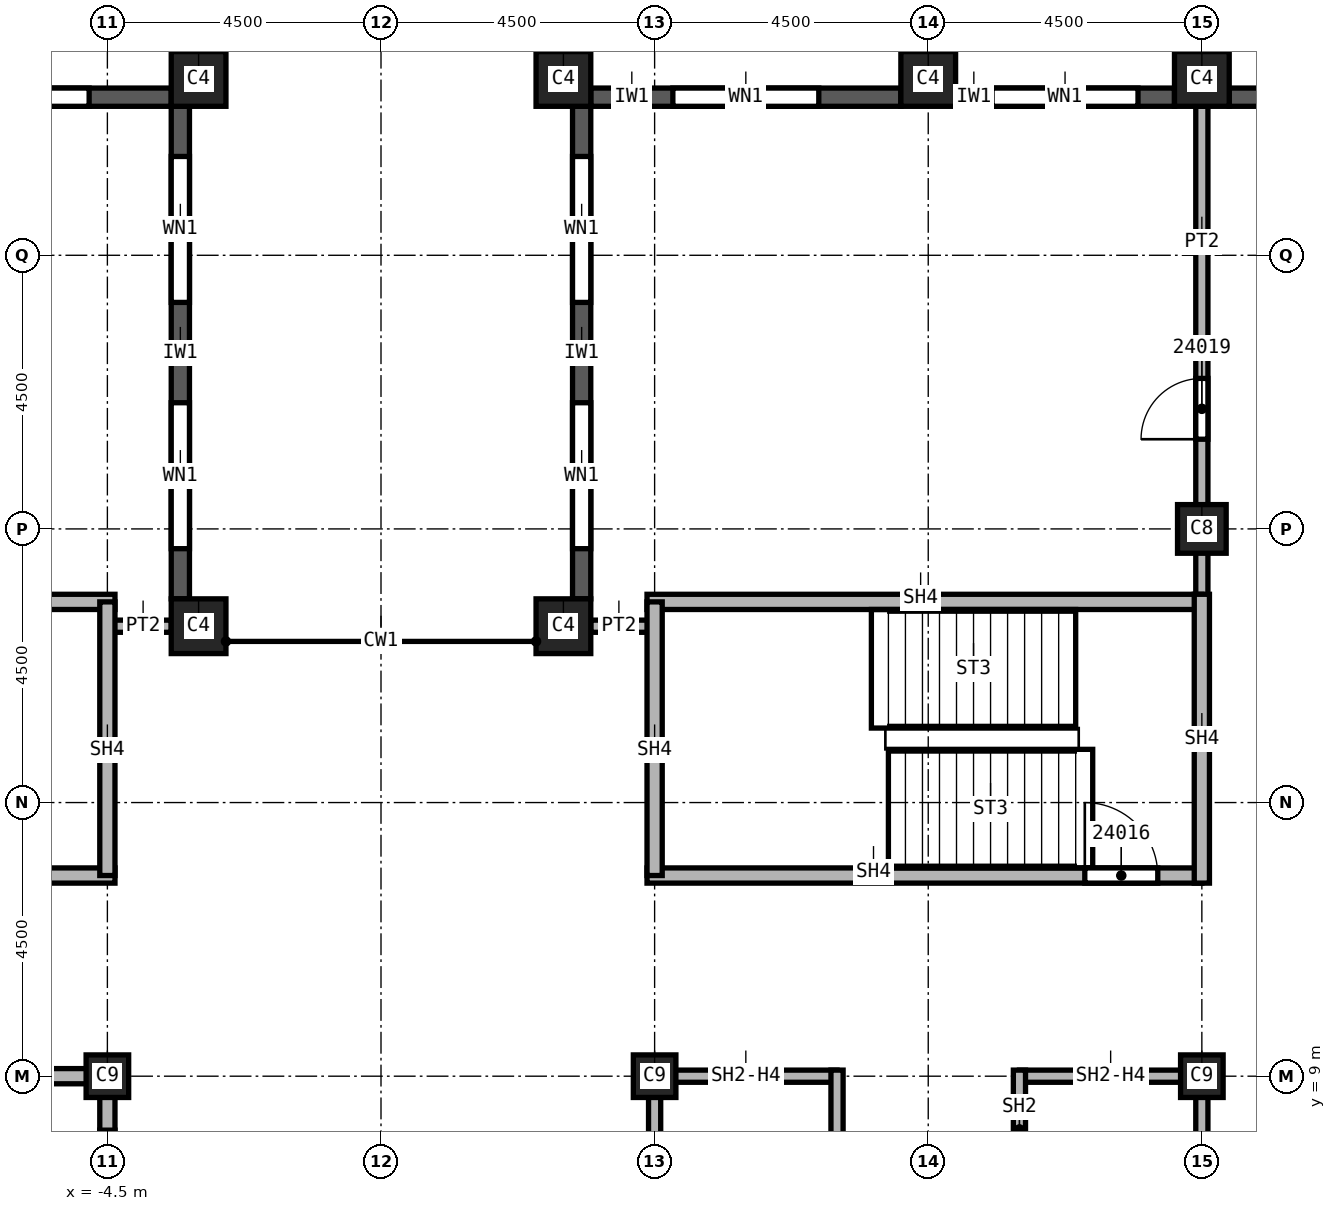
"""IFC4 building model, lengths in metres.
Left out: names, types, materials, properties, quantities, classifications, styles, units other than length and angle.
Written with IfcOpenShell. Run it as: python <this file> out.ifc"""

import sys

from ifc_helpers import new_model, si_unit, direction, frame, frame_2d, origin, origin_2d, place, context, subcontext, project, spatial, rectangle, extrude, element, fill, save


model = new_model("IFC4")
c1 = context("Model", 3, precision=1e-05, world=origin(), true_north=direction((0.0, 1.0)))
c2 = subcontext(c1, "Body", "Model", "MODEL_VIEW")
j1 = project(units=[si_unit("LENGTHUNIT", "METRE"), si_unit("PLANEANGLEUNIT", "RADIAN")], contexts=[c1])
p1 = place(None, origin())
s1 = spatial("IfcSite", under=j1, at=p1, CompositionType="ELEMENT")
p2 = place(p1, origin())
s2 = spatial("IfcBuilding", under=s1, at=p2, CompositionType="ELEMENT")
p3 = place(p2, frame((0.0, 0.0, 338.0)))
s3 = spatial("IfcBuildingStorey", under=s2, at=p3, CompositionType="ELEMENT", Elevation=338.0)
p4 = place(p3, frame((13.5, 18.0, 0.0), z_axis=(0.0, 0.0, 1.0), x_axis=(1.0, 0.0, 0.0)))
e1 = element("IfcColumn", 1, at=p4, inside=s3, PredefinedType="COLUMN", context=c2, shape_type="SweptSolid", body=[
    extrude(rectangle(XDim=0.8, YDim=0.8, at=origin_2d()), origin(), (0.0, 0.0, 1.0), 3.74),
])
for number, where, z_axis, x_axis in (
    (2, (4.5, 9.0, 0.0), (0.0, 0.0, 1.0), (1.0, 0.0, 0.0)),
    (3, (13.5, 9.0, 0.0), (0.0, 0.0, 1.0), (1.0, 0.0, 0.0)),
    (4, (-4.5, 9.0, 0.0), (0.0, 0.0, 1.0), (1.0, 0.0, 0.0)),
):
    element("IfcColumn", number, at=place(p3, frame(where, z_axis=z_axis, x_axis=x_axis)), inside=s3, PredefinedType="COLUMN", context=c2, shape_type="SweptSolid", body=[
        extrude(rectangle(XDim=0.7, YDim=0.7, at=origin_2d()), origin(), (0.0, 0.0, 1.0), 3.74),
    ])
for number, where, z_axis, x_axis in (
    (5, (3.0, 25.4, 0.0), (0.0, 0.0, 1.0), (1.0, 0.0, 0.0)),
    (6, (9.0, 25.4, 0.0), (0.0, 0.0, 1.0), (1.0, 0.0, 0.0)),
    (7, (13.5, 25.4, 0.0), (0.0, 0.0, 1.0), (1.0, 0.0, 0.0)),
    (8, (-3.0, 25.4, 0.0), (0.0, 0.0, 1.0), (1.0, 0.0, 0.0)),
    (9, (3.0, 16.4, 0.0), (0.0, 0.0, 1.0), (1.0, 0.0, 0.0)),
    (10, (-3.0, 16.4, 0.0), (0.0, 0.0, 1.0), (1.0, 0.0, 0.0)),
):
    element("IfcColumn", number, at=place(p3, frame(where, z_axis=z_axis, x_axis=x_axis)), inside=s3, PredefinedType="COLUMN", context=c2, shape_type="SweptSolid", body=[
        extrude(rectangle(XDim=0.9, YDim=0.9, at=origin_2d()), origin(), (0.0, 0.0, 1.0), 3.74),
    ])
p5 = place(p3, frame((17.55, 25.1, 0.0), z_axis=(0.0, 0.0, 1.0), x_axis=(-1.0, 0.0, 0.0)))
e11 = element("IfcWall", 11, at=p5, inside=s3, PredefinedType="SOLIDWALL", context=c2, shape_type="SweptSolid", body=[
    extrude(rectangle(XDim=3.6, YDim=0.3, at=frame_2d((1.8, 0.0))), origin(), (0.0, 0.0, 1.0), 3.14),
])
p6 = place(p5, frame((0.775, 0.0, 0.8)))
e12 = element("IfcOpeningElement", 12, at=p6, cuts=e11, PredefinedType="OPENING", context=c2, shape_type="SweptSolid", body=[
    extrude(rectangle(XDim=1.0, YDim=1.95, at=frame_2d((0.5, 0.975))), frame((0.0, 0.15, 0.0), z_axis=(0.0, -1.0, 0.0), x_axis=(1.0, 0.0, 0.0)), (0.0, 0.0, 1.0), 0.3),
])
p7 = place(p5, frame((2.375, 0.0, 0.8)))
e13 = element("IfcOpeningElement", 13, at=p7, cuts=e11, PredefinedType="OPENING", context=c2, shape_type="SweptSolid", body=[
    extrude(rectangle(XDim=0.6, YDim=1.95, at=frame_2d((0.3, 0.975))), frame((0.0, 0.15, 0.0), z_axis=(0.0, -1.0, 0.0), x_axis=(1.0, 0.0, 0.0)), (0.0, 0.0, 1.0), 0.3),
])
p8 = place(p3, frame((13.05, 25.1, 0.0), z_axis=(0.0, 0.0, 1.0), x_axis=(-1.0, 0.0, 0.0)))
e14 = element("IfcWall", 14, at=p8, inside=s3, PredefinedType="SOLIDWALL", context=c2, shape_type="SweptSolid", body=[
    extrude(rectangle(XDim=3.6, YDim=0.3, at=frame_2d((1.8, 0.0))), origin(), (0.0, 0.0, 1.0), 3.14),
])
p9 = place(p8, frame((0.6, 0.0, 0.8)))
e15 = element("IfcOpeningElement", 15, at=p9, cuts=e14, PredefinedType="OPENING", context=c2, shape_type="SweptSolid", body=[
    extrude(rectangle(XDim=2.4, YDim=1.95, at=frame_2d((1.2, 0.975))), frame((0.0, 0.15, 0.0), z_axis=(0.0, -1.0, 0.0), x_axis=(1.0, 0.0, 0.0)), (0.0, 0.0, 1.0), 0.3),
])
p10 = place(p3, frame((8.55, 25.1, 0.0), z_axis=(0.0, 0.0, 1.0), x_axis=(-1.0, 0.0, 0.0)))
e16 = element("IfcWall", 16, at=p10, inside=s3, PredefinedType="SOLIDWALL", context=c2, shape_type="SweptSolid", body=[
    extrude(rectangle(XDim=5.1, YDim=0.3, at=frame_2d((2.55, 0.0))), origin(), (0.0, 0.0, 1.0), 3.14),
])
p11 = place(p10, frame((1.35, 0.0, 0.8)))
e17 = element("IfcOpeningElement", 17, at=p11, cuts=e16, PredefinedType="OPENING", context=c2, shape_type="SweptSolid", body=[
    extrude(rectangle(XDim=2.4, YDim=1.95, at=frame_2d((1.2, 0.975))), frame((0.0, 0.15, 0.0), z_axis=(0.0, -1.0, 0.0), x_axis=(1.0, 0.0, 0.0)), (0.0, 0.0, 1.0), 0.3),
])
p12 = place(p3, frame((3.3, 24.95, 0.0), z_axis=(0.0, 0.0, 1.0), x_axis=(0.0, -1.0, 0.0)))
e18 = element("IfcWall", 18, at=p12, inside=s3, PredefinedType="SOLIDWALL", context=c2, shape_type="SweptSolid", body=[
    extrude(rectangle(XDim=8.1, YDim=0.3, at=frame_2d((4.05, 0.0))), origin(), (0.0, 0.0, 1.0), 3.14),
])
p13 = place(p12, frame((0.825, 0.0, 0.8)))
e19 = element("IfcOpeningElement", 19, at=p13, cuts=e18, PredefinedType="OPENING", context=c2, shape_type="SweptSolid", body=[
    extrude(rectangle(XDim=2.4, YDim=1.95, at=frame_2d((1.2, 0.975))), frame((0.0, 0.15, 0.0), z_axis=(0.0, -1.0, 0.0), x_axis=(1.0, 0.0, 0.0)), (0.0, 0.0, 1.0), 0.3),
])
p14 = place(p12, frame((4.875, 0.0, 0.8)))
e20 = element("IfcOpeningElement", 20, at=p14, cuts=e18, PredefinedType="OPENING", context=c2, shape_type="SweptSolid", body=[
    extrude(rectangle(XDim=2.4, YDim=1.95, at=frame_2d((1.2, 0.975))), frame((0.0, 0.15, 0.0), z_axis=(0.0, -1.0, 0.0), x_axis=(1.0, 0.0, 0.0)), (0.0, 0.0, 1.0), 0.3),
])
p15 = place(p3, frame((-3.3, 16.85, 0.0), z_axis=(0.0, 0.0, 1.0), x_axis=(0.0, 1.0, 0.0)))
e21 = element("IfcWall", 21, at=p15, inside=s3, PredefinedType="SOLIDWALL", context=c2, shape_type="SweptSolid", body=[
    extrude(rectangle(XDim=8.1, YDim=0.3, at=frame_2d((4.05, 0.0))), origin(), (0.0, 0.0, 1.0), 3.14),
])
p16 = place(p15, frame((0.825, 0.0, 0.8)))
e22 = element("IfcOpeningElement", 22, at=p16, cuts=e21, PredefinedType="OPENING", context=c2, shape_type="SweptSolid", body=[
    extrude(rectangle(XDim=2.4, YDim=1.95, at=frame_2d((1.2, 0.975))), frame((0.0, 0.15, 0.0), z_axis=(0.0, -1.0, 0.0), x_axis=(1.0, 0.0, 0.0)), (0.0, 0.0, 1.0), 0.3),
])
p17 = place(p15, frame((4.875, 0.0, 0.8)))
e23 = element("IfcOpeningElement", 23, at=p17, cuts=e21, PredefinedType="OPENING", context=c2, shape_type="SweptSolid", body=[
    extrude(rectangle(XDim=2.4, YDim=1.95, at=frame_2d((1.2, 0.975))), frame((0.0, 0.15, 0.0), z_axis=(0.0, -1.0, 0.0), x_axis=(1.0, 0.0, 0.0)), (0.0, 0.0, 1.0), 0.3),
])
p18 = place(p3, frame((-3.45, 25.1, 0.0), z_axis=(0.0, 0.0, 1.0), x_axis=(-1.0, 0.0, 0.0)))
e24 = element("IfcWall", 24, at=p18, inside=s3, PredefinedType="SOLIDWALL", context=c2, shape_type="SweptSolid", body=[
    extrude(rectangle(XDim=5.1, YDim=0.3, at=frame_2d((2.55, 0.0))), origin(), (0.0, 0.0, 1.0), 3.14),
])
p19 = place(p18, frame((1.35, 0.0, 0.8)))
e25 = element("IfcOpeningElement", 25, at=p19, cuts=e24, PredefinedType="OPENING", context=c2, shape_type="SweptSolid", body=[
    extrude(rectangle(XDim=2.4, YDim=1.95, at=frame_2d((1.2, 0.975))), frame((0.0, 0.15, 0.0), z_axis=(0.0, -1.0, 0.0), x_axis=(1.0, 0.0, 0.0)), (0.0, 0.0, 1.0), 0.3),
])
for number, where, z_axis, x_axis in (
    (26, (-4.5, 16.4, 0.0), (0.0, 0.0, 1.0), (1.0, 0.0, 0.0)),
    (27, (3.45, 16.4, 0.0), (0.0, 0.0, 1.0), (1.0, 0.0, 0.0)),
):
    element("IfcWall", number, at=place(p3, frame(where, z_axis=z_axis, x_axis=x_axis)), inside=s3, PredefinedType="PARTITIONING", context=c2, shape_type="SweptSolid", body=[
        extrude(rectangle(XDim=1.05, YDim=0.2, at=frame_2d((0.525, 0.0))), origin(), (0.0, 0.0, 1.0), 3.74),
    ])
p20 = place(p3, frame((13.5, 16.675, 0.0), z_axis=(0.0, 0.0, 1.0), x_axis=(0.0, 1.0, 0.0)))
e28 = element("IfcWall", 28, at=p20, inside=s3, PredefinedType="PARTITIONING", context=c2, shape_type="SweptSolid", body=[
    extrude(rectangle(XDim=8.275, YDim=0.2, at=frame_2d((4.137, 0.0))), origin(), (0.0, 0.0, 1.0), 3.74),
])
p21 = place(p20, frame((2.8, 0.0, 0.0)))
e29 = element("IfcOpeningElement", 29, at=p21, cuts=e28, PredefinedType="OPENING", context=c2, shape_type="SweptSolid", body=[
    extrude(rectangle(XDim=1.0, YDim=2.1, at=frame_2d((0.5, 1.05))), frame((0.0, 0.1, 0.0), z_axis=(0.0, -1.0, 0.0), x_axis=(1.0, 0.0, 0.0)), (0.0, 0.0, 1.0), 0.2),
])
p22 = place(p3, frame((4.5, -6.0, 0.0), z_axis=(0.0, 0.0, 1.0), x_axis=(0.0, 1.0, 0.0)))
e30 = element("IfcWall", 30, at=p22, inside=s3, PredefinedType="SOLIDWALL", context=c2, shape_type="SweptSolid", body=[
    extrude(rectangle(XDim=15.1, YDim=0.2, at=frame_2d((7.55, 0.0))), origin(), (0.0, 0.0, 1.0), 3.062),
])
p23 = place(p22, frame((1.6, 0.0, 0.0)))
e31 = element("IfcOpeningElement", 31, at=p23, cuts=e30, PredefinedType="OPENING", context=c2, shape_type="SweptSolid", body=[
    extrude(rectangle(XDim=1.1, YDim=2.1, at=frame_2d((0.55, 1.05))), frame((0.0, 0.1, 0.0), z_axis=(0.0, -1.0, 0.0), x_axis=(1.0, 0.0, 0.0)), (0.0, 0.0, 1.0), 0.2),
])
p24 = place(p22, frame((8.2, 0.0, 0.0)))
e32 = element("IfcOpeningElement", 32, at=p24, cuts=e30, PredefinedType="OPENING", context=c2, shape_type="SweptSolid", body=[
    extrude(rectangle(XDim=1.1, YDim=2.1, at=frame_2d((0.55, 1.05))), frame((0.0, 0.1, 0.0), z_axis=(0.0, -1.0, 0.0), x_axis=(1.0, 0.0, 0.0)), (0.0, 0.0, 1.0), 0.2),
])
p25 = place(p3, frame((4.5, 9.0, 0.0), z_axis=(0.0, 0.0, 1.0), x_axis=(1.0, 0.0, 0.0)))
e33 = element("IfcWall", 33, at=p25, inside=s3, PredefinedType="SOLIDWALL", context=c2, shape_type="SweptSolid", body=[
    extrude(rectangle(XDim=3.0, YDim=0.2, at=frame_2d((1.5, 0.0))), origin(), (0.0, 0.0, 1.0), 3.062),
])
p26 = place(p3, frame((7.5, 9.1, 0.0), z_axis=(0.0, 0.0, 1.0), x_axis=(0.0, -1.0, 0.0)))
e34 = element("IfcWall", 34, at=p26, inside=s3, PredefinedType="SOLIDWALL", context=c2, shape_type="SweptSolid", body=[
    extrude(rectangle(XDim=6.225, YDim=0.2, at=frame_2d((3.113, 0.0))), origin(), (0.0, 0.0, 1.0), 3.74),
])
p27 = place(p3, frame((10.5, 9.0, 0.0), z_axis=(0.0, 0.0, 1.0), x_axis=(1.0, 0.0, 0.0)))
e35 = element("IfcWall", 35, at=p27, inside=s3, PredefinedType="SOLIDWALL", context=c2, shape_type="SweptSolid", body=[
    extrude(rectangle(XDim=3.0, YDim=0.2, at=frame_2d((1.5, 0.0))), origin(), (0.0, 0.0, 1.0), 3.062),
])
p28 = place(p3, frame((10.5, 9.1, 0.0), z_axis=(0.0, 0.0, 1.0), x_axis=(0.0, -1.0, 0.0)))
e36 = element("IfcWall", 36, at=p28, inside=s3, PredefinedType="SOLIDWALL", context=c2, shape_type="SweptSolid", body=[
    extrude(rectangle(XDim=3.225, YDim=0.2, at=frame_2d((1.613, 0.0))), origin(), (0.0, 0.0, 1.0), 3.74),
])
p29 = place(p28, frame((1.75, 0.0, 0.0)))
e37 = element("IfcOpeningElement", 37, at=p29, cuts=e36, PredefinedType="OPENING", context=c2, shape_type="SweptSolid", body=[
    extrude(rectangle(XDim=1.1, YDim=2.1, at=frame_2d((0.55, 1.05))), frame((0.0, 0.1, 0.0), z_axis=(0.0, -1.0, 0.0), x_axis=(1.0, 0.0, 0.0)), (0.0, 0.0, 1.0), 0.2),
])
p30 = place(p3, frame((13.5, 9.1, 0.0), z_axis=(0.0, 0.0, 1.0), x_axis=(0.0, -1.0, 0.0)))
e38 = element("IfcWall", 38, at=p30, inside=s3, PredefinedType="SOLIDWALL", context=c2, shape_type="SweptSolid", body=[
    extrude(rectangle(XDim=3.1, YDim=0.2, at=frame_2d((1.55, 0.0))), origin(), (0.0, 0.0, 1.0), 3.062),
])
p31 = place(p3, frame((-7.5, 9.0, 0.0), z_axis=(0.0, 0.0, 1.0), x_axis=(1.0, 0.0, 0.0)))
e39 = element("IfcWall", 39, at=p31, inside=s3, PredefinedType="SOLIDWALL", context=c2, shape_type="SweptSolid", body=[
    extrude(rectangle(XDim=3.0, YDim=0.25, at=frame_2d((1.5, 0.0))), origin(), (0.0, 0.0, 1.0), 3.062),
])
p32 = place(p3, frame((-4.5, 9.125, 0.0), z_axis=(0.0, 0.0, 1.0), x_axis=(0.0, -1.0, 0.0)))
e40 = element("IfcWall", 40, at=p32, inside=s3, PredefinedType="SOLIDWALL", context=c2, shape_type="SweptSolid", body=[
    extrude(rectangle(XDim=3.125, YDim=0.25, at=frame_2d((1.562, 0.0))), origin(), (0.0, 0.0, 1.0), 3.062),
])
p33 = place(p32, frame((1.012, 0.0, 0.0)))
e41 = element("IfcOpeningElement", 41, at=p33, cuts=e40, PredefinedType="OPENING", context=c2, shape_type="SweptSolid", body=[
    extrude(rectangle(XDim=1.1, YDim=2.1, at=frame_2d((0.55, 1.05))), frame((0.0, 0.125, 0.0), z_axis=(0.0, -1.0, 0.0), x_axis=(1.0, 0.0, 0.0)), (0.0, 0.0, 1.0), 0.25),
])
p34 = place(p3, frame((-13.5, 12.3, 0.0), z_axis=(0.0, 0.0, 1.0), x_axis=(1.0, 0.0, 0.0)))
e42 = element("IfcWall", 42, at=p34, inside=s3, PredefinedType="SOLIDWALL", context=c2, shape_type="SweptSolid", body=[
    extrude(rectangle(XDim=9.125, YDim=0.25, at=frame_2d((4.562, 0.0))), origin(), (0.0, 0.0, 1.0), 3.74),
])
p35 = place(p34, frame((0.6, 0.0, 0.0)))
e43 = element("IfcOpeningElement", 43, at=p35, cuts=e42, PredefinedType="OPENING", context=c2, shape_type="SweptSolid", body=[
    extrude(rectangle(XDim=1.2, YDim=2.1, at=frame_2d((0.6, 1.05))), frame((0.0, 0.125, 0.0), z_axis=(0.0, -1.0, 0.0), x_axis=(1.0, 0.0, 0.0)), (0.0, 0.0, 1.0), 0.25),
])
p36 = place(p3, frame((-13.5, 16.8, 0.0), z_axis=(0.0, 0.0, 1.0), x_axis=(1.0, 0.0, 0.0)))
e44 = element("IfcWall", 44, at=p36, inside=s3, PredefinedType="SOLIDWALL", context=c2, shape_type="SweptSolid", body=[
    extrude(rectangle(XDim=9.125, YDim=0.25, at=frame_2d((4.562, 0.0))), origin(), (0.0, 0.0, 1.0), 3.74),
])
p37 = place(p3, frame((-4.5, 16.8, 0.0), z_axis=(0.0, 0.0, 1.0), x_axis=(0.0, -1.0, 0.0)))
e45 = element("IfcWall", 45, at=p37, inside=s3, PredefinedType="SOLIDWALL", context=c2, shape_type="SweptSolid", body=[
    extrude(rectangle(XDim=4.5, YDim=0.25, at=frame_2d((2.25, 0.0))), origin(), (0.0, 0.0, 1.0), 3.74),
])
p38 = place(p3, frame((4.375, 12.3, 0.0), z_axis=(0.0, 0.0, 1.0), x_axis=(1.0, 0.0, 0.0)))
e46 = element("IfcWall", 46, at=p38, inside=s3, PredefinedType="SOLIDWALL", context=c2, shape_type="SweptSolid", body=[
    extrude(rectangle(XDim=9.125, YDim=0.25, at=frame_2d((4.562, 0.0))), origin(), (0.0, 0.0, 1.0), 3.74),
])
p39 = place(p38, frame((7.2, 0.0, 0.0)))
e47 = element("IfcOpeningElement", 47, at=p39, cuts=e46, PredefinedType="OPENING", context=c2, shape_type="SweptSolid", body=[
    extrude(rectangle(XDim=1.2, YDim=2.1, at=frame_2d((0.6, 1.05))), frame((0.0, 0.125, 0.0), z_axis=(0.0, -1.0, 0.0), x_axis=(1.0, 0.0, 0.0)), (0.0, 0.0, 1.0), 0.25),
])
p40 = place(p3, frame((4.375, 16.8, 0.0), z_axis=(0.0, 0.0, 1.0), x_axis=(1.0, 0.0, 0.0)))
e48 = element("IfcWall", 48, at=p40, inside=s3, PredefinedType="SOLIDWALL", context=c2, shape_type="SweptSolid", body=[
    extrude(rectangle(XDim=9.125, YDim=0.25, at=frame_2d((4.562, 0.0))), origin(), (0.0, 0.0, 1.0), 3.74),
])
p41 = place(p3, frame((4.5, 12.3, 0.0), z_axis=(0.0, 0.0, 1.0), x_axis=(0.0, 1.0, 0.0)))
e49 = element("IfcWall", 49, at=p41, inside=s3, PredefinedType="SOLIDWALL", context=c2, shape_type="SweptSolid", body=[
    extrude(rectangle(XDim=4.5, YDim=0.25, at=frame_2d((2.25, 0.0))), origin(), (0.0, 0.0, 1.0), 3.74),
])
p42 = place(p3, frame((13.5, 12.175, 0.0), z_axis=(0.0, 0.0, 1.0), x_axis=(0.0, 1.0, 0.0)))
e50 = element("IfcWall", 50, at=p42, inside=s3, PredefinedType="SOLIDWALL", context=c2, shape_type="SweptSolid", body=[
    extrude(rectangle(XDim=4.75, YDim=0.25, at=frame_2d((2.375, 0.0))), origin(), (0.0, 0.0, 1.0), 3.74),
])
p43 = place(p9, origin())
e51 = element("IfcWindow", 51, at=p43, inside=s3, PartitioningType="SINGLE_PANEL", PredefinedType="WINDOW", context=c2, shape_type="SweptSolid", body=[
    extrude(rectangle(XDim=2.4, YDim=1.95, at=frame_2d((1.2, 0.975))), frame((0.0, 0.03, 0.0), z_axis=(0.0, -1.0, 0.0), x_axis=(1.0, 0.0, 0.0)), (0.0, 0.0, 1.0), 0.06),
])
fill(e15, e51)
p44 = place(p11, origin())
e52 = element("IfcWindow", 52, at=p44, inside=s3, PartitioningType="SINGLE_PANEL", PredefinedType="WINDOW", context=c2, shape_type="SweptSolid", body=[
    extrude(rectangle(XDim=2.4, YDim=1.95, at=frame_2d((1.2, 0.975))), frame((0.0, 0.03, 0.0), z_axis=(0.0, -1.0, 0.0), x_axis=(1.0, 0.0, 0.0)), (0.0, 0.0, 1.0), 0.06),
])
fill(e17, e52)
p45 = place(p13, origin())
e53 = element("IfcWindow", 53, at=p45, inside=s3, PartitioningType="SINGLE_PANEL", PredefinedType="WINDOW", context=c2, shape_type="SweptSolid", body=[
    extrude(rectangle(XDim=2.4, YDim=1.95, at=frame_2d((1.2, 0.975))), frame((0.0, 0.03, 0.0), z_axis=(0.0, -1.0, 0.0), x_axis=(1.0, 0.0, 0.0)), (0.0, 0.0, 1.0), 0.06),
])
fill(e19, e53)
p46 = place(p14, origin())
e54 = element("IfcWindow", 54, at=p46, inside=s3, PartitioningType="SINGLE_PANEL", PredefinedType="WINDOW", context=c2, shape_type="SweptSolid", body=[
    extrude(rectangle(XDim=2.4, YDim=1.95, at=frame_2d((1.2, 0.975))), frame((0.0, 0.03, 0.0), z_axis=(0.0, -1.0, 0.0), x_axis=(1.0, 0.0, 0.0)), (0.0, 0.0, 1.0), 0.06),
])
fill(e20, e54)
p47 = place(p16, origin())
e55 = element("IfcWindow", 55, at=p47, inside=s3, PartitioningType="SINGLE_PANEL", PredefinedType="WINDOW", context=c2, shape_type="SweptSolid", body=[
    extrude(rectangle(XDim=2.4, YDim=1.95, at=frame_2d((1.2, 0.975))), frame((0.0, 0.03, 0.0), z_axis=(0.0, -1.0, 0.0), x_axis=(1.0, 0.0, 0.0)), (0.0, 0.0, 1.0), 0.06),
])
fill(e22, e55)
p48 = place(p17, origin())
e56 = element("IfcWindow", 56, at=p48, inside=s3, PartitioningType="SINGLE_PANEL", PredefinedType="WINDOW", context=c2, shape_type="SweptSolid", body=[
    extrude(rectangle(XDim=2.4, YDim=1.95, at=frame_2d((1.2, 0.975))), frame((0.0, 0.03, 0.0), z_axis=(0.0, -1.0, 0.0), x_axis=(1.0, 0.0, 0.0)), (0.0, 0.0, 1.0), 0.06),
])
fill(e23, e56)
p49 = place(p19, origin())
e57 = element("IfcWindow", 57, at=p49, inside=s3, PartitioningType="SINGLE_PANEL", PredefinedType="WINDOW", context=c2, shape_type="SweptSolid", body=[
    extrude(rectangle(XDim=2.4, YDim=1.95, at=frame_2d((1.2, 0.975))), frame((0.0, 0.03, 0.0), z_axis=(0.0, -1.0, 0.0), x_axis=(1.0, 0.0, 0.0)), (0.0, 0.0, 1.0), 0.06),
])
fill(e25, e57)
p50 = place(p39, origin())
e58 = element("IfcDoor", 58, at=p50, inside=s3, OperationType="SINGLE_SWING_LEFT", PredefinedType="DOOR", context=c2, shape_type="SweptSolid", body=[
    extrude(rectangle(XDim=1.2, YDim=2.1, at=frame_2d((0.6, 1.05))), frame((0.0, 0.025, 0.0), z_axis=(0.0, -1.0, 0.0), x_axis=(1.0, 0.0, 0.0)), (0.0, 0.0, 1.0), 0.05),
])
fill(e47, e58)
p51 = place(p21, origin())
e59 = element("IfcDoor", 59, at=p51, inside=s3, OperationType="SINGLE_SWING_RIGHT", PredefinedType="DOOR", context=c2, shape_type="SweptSolid", body=[
    extrude(rectangle(XDim=1.0, YDim=2.1, at=frame_2d((0.5, 1.05))), frame((0.0, 0.025, 0.0), z_axis=(0.0, -1.0, 0.0), x_axis=(1.0, 0.0, 0.0)), (0.0, 0.0, 1.0), 0.05),
])
fill(e29, e59)
p52 = place(p33, origin())
e60 = element("IfcDoor", 60, at=p52, inside=s3, OperationType="SLIDING_TO_LEFT", PredefinedType="DOOR", context=c2, shape_type="SweptSolid", body=[
    extrude(rectangle(XDim=1.1, YDim=2.1, at=frame_2d((0.55, 1.05))), frame((0.0, 0.025, 0.0), z_axis=(0.0, -1.0, 0.0), x_axis=(1.0, 0.0, 0.0)), (0.0, 0.0, 1.0), 0.05),
])
fill(e41, e60)
save(model, sys.argv[1])
